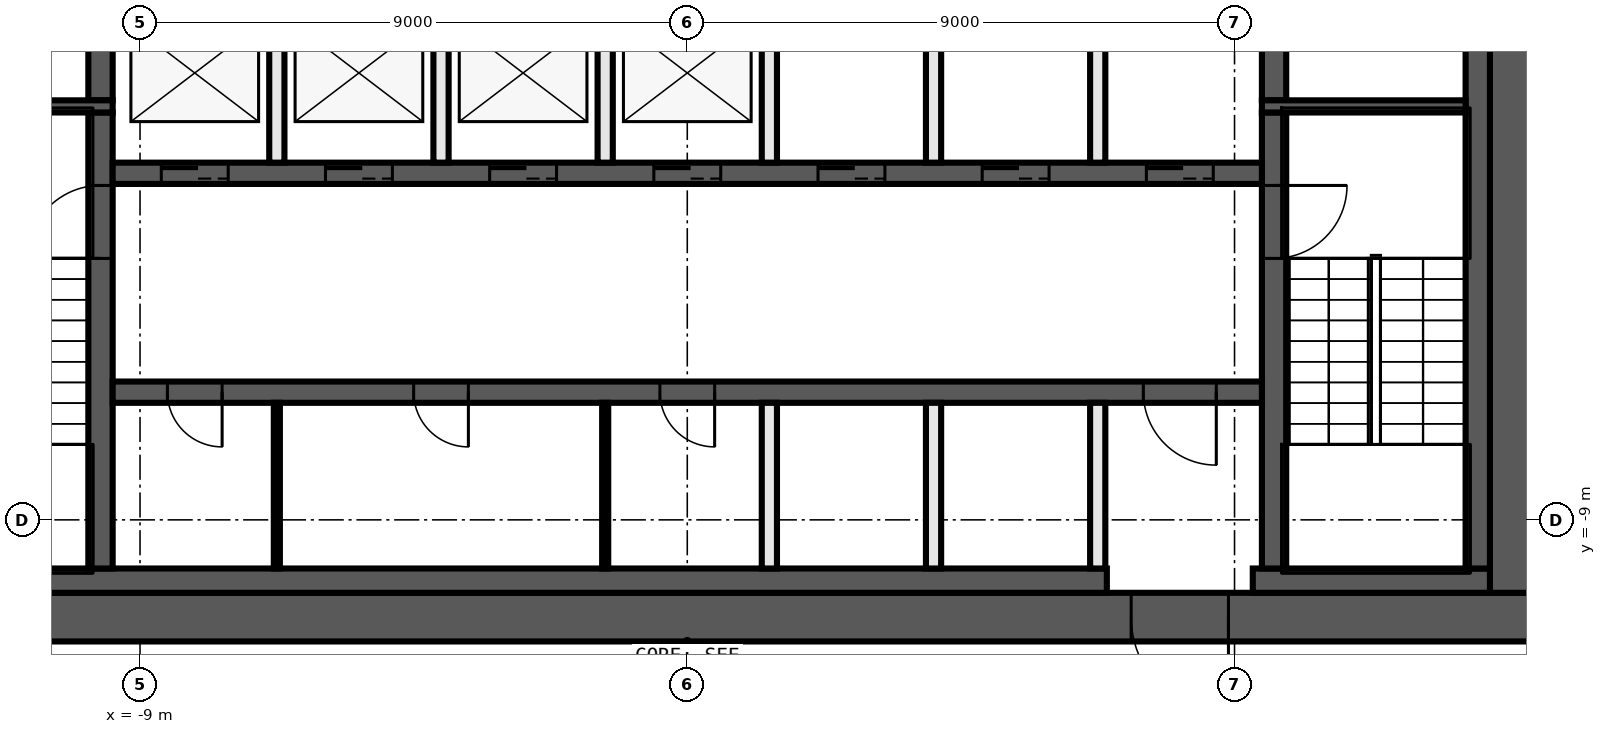
"""IFC4 building model, lengths in metres.
Left out: names, types, materials, properties, quantities, classifications, styles, units other than length and angle.
Written with IfcOpenShell. Run it as: python <this file> out.ifc"""

import sys

from ifc_helpers import new_model, si_unit, direction, frame, frame_2d, origin, place, context, subcontext, project, spatial, rectangle, extrude, element, fill, save


model = new_model("IFC4")
c1 = context("Model", 3, precision=1e-05, world=origin(), true_north=direction((0.0, 1.0)))
c2 = subcontext(c1, "Body", "Model", "MODEL_VIEW")
j1 = project(units=[si_unit("LENGTHUNIT", "METRE"), si_unit("PLANEANGLEUNIT", "RADIAN")], contexts=[c1])
p1 = place(None, origin())
s1 = spatial("IfcSite", under=j1, at=p1, CompositionType="ELEMENT")
p2 = place(p1, origin())
s2 = spatial("IfcBuilding", under=s1, at=p2, CompositionType="ELEMENT")
p3 = place(p2, frame((0.0, 0.0, 151.6)))
s3 = spatial("IfcBuildingStorey", under=s2, at=p3, CompositionType="ELEMENT", Elevation=151.6)
p4 = place(p3, frame((14.0, -10.6, 0.0), z_axis=(0.0, 0.0, 1.0), x_axis=(-1.0, 0.0, 0.0)))
e1 = element("IfcWall", 1, at=p4, inside=s3, PredefinedType="SHEAR", context=c2, shape_type="SweptSolid", body=[
    extrude(rectangle(XDim=28.0, YDim=0.8, at=frame_2d((14.0, 0.0))), origin(), (0.0, 0.0, 1.0), 6.62),
])
p5 = place(p4, frame((5.1, 0.0, 0.0)))
e2 = element("IfcOpeningElement", 2, at=p5, cuts=e1, PredefinedType="OPENING", context=c2, shape_type="SweptSolid", body=[
    extrude(rectangle(XDim=1.6, YDim=2.1, at=frame_2d((0.8, 1.05))), frame((0.0, 0.41, 0.0), z_axis=(0.0, -1.0, 0.0), x_axis=(1.0, 0.0, 0.0)), (0.0, 0.0, 1.0), 0.82),
])
p6 = place(p3, frame((13.6, 10.2, 0.0), z_axis=(0.0, 0.0, 1.0), x_axis=(0.0, -1.0, 0.0)))
e3 = element("IfcWall", 3, at=p6, inside=s3, PredefinedType="SHEAR", context=c2, shape_type="SweptSolid", body=[
    extrude(rectangle(XDim=20.4, YDim=0.8, at=frame_2d((10.2, 0.0))), origin(), (0.0, 0.0, 1.0), 6.62),
])
p7 = place(p3, frame((13.2, -10.0, 0.0), z_axis=(0.0, 0.0, 1.0), x_axis=(-1.0, 0.0, 0.0)))
e4 = element("IfcWall", 4, at=p7, inside=s3, PredefinedType="SHEAR", context=c2, shape_type="SweptSolid", body=[
    extrude(rectangle(XDim=3.9, YDim=0.4, at=frame_2d((1.95, 0.0))), origin(), (0.0, 0.0, 1.0), 6.62),
])
p8 = place(p3, frame((6.9, -10.0, 0.0), z_axis=(0.0, 0.0, 1.0), x_axis=(-1.0, 0.0, 0.0)))
e5 = element("IfcWall", 5, at=p8, inside=s3, PredefinedType="SHEAR", context=c2, shape_type="SweptSolid", body=[
    extrude(rectangle(XDim=20.1, YDim=0.4, at=frame_2d((10.05, 0.0))), origin(), (0.0, 0.0, 1.0), 6.62),
])
p9 = place(p3, frame((13.0, 9.8, 0.0), z_axis=(0.0, 0.0, 1.0), x_axis=(0.0, -1.0, 0.0)))
e6 = element("IfcWall", 6, at=p9, inside=s3, PredefinedType="SHEAR", context=c2, shape_type="SweptSolid", body=[
    extrude(rectangle(XDim=19.6, YDim=0.4, at=frame_2d((9.8, 0.0))), origin(), (0.0, 0.0, 1.0), 6.62),
])
p10 = place(p3, frame((9.65, -2.3, 0.0), z_axis=(0.0, 0.0, 1.0), x_axis=(0.0, -1.0, 0.0)))
e7 = element("IfcWall", 7, at=p10, inside=s3, PredefinedType="SHEAR", context=c2, shape_type="SweptSolid", body=[
    extrude(rectangle(XDim=7.5, YDim=0.4, at=frame_2d((3.75, 0.0))), origin(), (0.0, 0.0, 1.0), 6.62),
])
p11 = place(p10, frame((1.2, 0.0, 0.0)))
e8 = element("IfcOpeningElement", 8, at=p11, cuts=e7, PredefinedType="OPENING", context=c2, shape_type="SweptSolid", body=[
    extrude(rectangle(XDim=1.2, YDim=2.1, at=frame_2d((0.6, 1.05))), frame((0.0, 0.21, 0.0), z_axis=(0.0, -1.0, 0.0), x_axis=(1.0, 0.0, 0.0)), (0.0, 0.0, 1.0), 0.42),
])
p12 = place(p3, frame((9.65, 2.1, 0.0), z_axis=(0.0, 0.0, 1.0), x_axis=(0.0, -1.0, 0.0)))
e9 = element("IfcWall", 9, at=p12, inside=s3, PredefinedType="SHEAR", context=c2, shape_type="SweptSolid", body=[
    extrude(rectangle(XDim=4.2, YDim=0.4, at=frame_2d((2.1, 0.0))), origin(), (0.0, 0.0, 1.0), 6.62),
])
p13 = place(p12, frame((0.15, 0.0, 0.0)))
e10 = element("IfcOpeningElement", 10, at=p13, cuts=e9, PredefinedType="OPENING", context=c2, shape_type="SweptSolid", body=[
    extrude(rectangle(XDim=0.9, YDim=2.1, at=frame_2d((0.45, 1.05))), frame((0.0, 0.21, 0.0), z_axis=(0.0, -1.0, 0.0), x_axis=(1.0, 0.0, 0.0)), (0.0, 0.0, 1.0), 0.42),
])
p14 = place(p3, frame((-9.65, -9.8, 0.0), z_axis=(0.0, 0.0, 1.0), x_axis=(0.0, 1.0, 0.0)))
e11 = element("IfcWall", 11, at=p14, inside=s3, PredefinedType="SHEAR", context=c2, shape_type="SweptSolid", body=[
    extrude(rectangle(XDim=7.5, YDim=0.4, at=frame_2d((3.75, 0.0))), origin(), (0.0, 0.0, 1.0), 6.62),
])
p15 = place(p14, frame((5.1, 0.0, 0.0)))
e12 = element("IfcOpeningElement", 12, at=p15, cuts=e11, PredefinedType="OPENING", context=c2, shape_type="SweptSolid", body=[
    extrude(rectangle(XDim=1.2, YDim=2.1, at=frame_2d((0.6, 1.05))), frame((0.0, 0.21, 0.0), z_axis=(0.0, -1.0, 0.0), x_axis=(1.0, 0.0, 0.0)), (0.0, 0.0, 1.0), 0.42),
])
p16 = place(p3, frame((-9.65, -2.1, 0.0), z_axis=(0.0, 0.0, 1.0), x_axis=(0.0, 1.0, 0.0)))
e13 = element("IfcWall", 13, at=p16, inside=s3, PredefinedType="SHEAR", context=c2, shape_type="SweptSolid", body=[
    extrude(rectangle(XDim=4.2, YDim=0.4, at=frame_2d((2.1, 0.0))), origin(), (0.0, 0.0, 1.0), 6.62),
])
for number, where, z_axis, x_axis in (
    (14, (9.45, -2.2, 0.0), (0.0, 0.0, 1.0), (1.0, 0.0, 0.0)),
    (15, (-9.45, -2.2, 0.0), (0.0, 0.0, 1.0), (-1.0, 0.0, 0.0)),
):
    element("IfcWall", number, at=place(p3, frame(where, z_axis=z_axis, x_axis=x_axis)), inside=s3, PredefinedType="SHEAR", context=c2, shape_type="SweptSolid", body=[
        extrude(rectangle(XDim=3.35, YDim=0.2, at=frame_2d((1.675, 0.0))), origin(), (0.0, 0.0, 1.0), 6.62),
    ])
p17 = place(p3, frame((-9.45, -3.3, 0.0), z_axis=(0.0, 0.0, 1.0), x_axis=(1.0, 0.0, 0.0)))
e16 = element("IfcWall", 16, at=p17, inside=s3, PredefinedType="SHEAR", context=c2, shape_type="SweptSolid", body=[
    extrude(rectangle(XDim=18.9, YDim=0.35, at=frame_2d((9.45, 0.0))), origin(), (0.0, 0.0, 1.0), 6.62),
])
p18 = place(p17, frame((0.8, 0.0, 0.0)))
e17 = element("IfcOpeningElement", 17, at=p18, cuts=e16, PredefinedType="OPENING", context=c2, shape_type="SweptSolid", body=[
    extrude(rectangle(XDim=1.1, YDim=2.1, at=frame_2d((0.55, 1.05))), frame((0.0, 0.185, 0.0), z_axis=(0.0, -1.0, 0.0), x_axis=(1.0, 0.0, 0.0)), (0.0, 0.0, 1.0), 0.37),
])
p19 = place(p17, frame((3.5, 0.0, 0.0)))
e18 = element("IfcOpeningElement", 18, at=p19, cuts=e16, PredefinedType="OPENING", context=c2, shape_type="SweptSolid", body=[
    extrude(rectangle(XDim=1.1, YDim=2.1, at=frame_2d((0.55, 1.05))), frame((0.0, 0.185, 0.0), z_axis=(0.0, -1.0, 0.0), x_axis=(1.0, 0.0, 0.0)), (0.0, 0.0, 1.0), 0.37),
])
p20 = place(p17, frame((6.2, 0.0, 0.0)))
e19 = element("IfcOpeningElement", 19, at=p20, cuts=e16, PredefinedType="OPENING", context=c2, shape_type="SweptSolid", body=[
    extrude(rectangle(XDim=1.1, YDim=2.1, at=frame_2d((0.55, 1.05))), frame((0.0, 0.185, 0.0), z_axis=(0.0, -1.0, 0.0), x_axis=(1.0, 0.0, 0.0)), (0.0, 0.0, 1.0), 0.37),
])
p21 = place(p17, frame((8.9, 0.0, 0.0)))
e20 = element("IfcOpeningElement", 20, at=p21, cuts=e16, PredefinedType="OPENING", context=c2, shape_type="SweptSolid", body=[
    extrude(rectangle(XDim=1.1, YDim=2.1, at=frame_2d((0.55, 1.05))), frame((0.0, 0.185, 0.0), z_axis=(0.0, -1.0, 0.0), x_axis=(1.0, 0.0, 0.0)), (0.0, 0.0, 1.0), 0.37),
])
p22 = place(p17, frame((11.6, 0.0, 0.0)))
e21 = element("IfcOpeningElement", 21, at=p22, cuts=e16, PredefinedType="OPENING", context=c2, shape_type="SweptSolid", body=[
    extrude(rectangle(XDim=1.1, YDim=2.1, at=frame_2d((0.55, 1.05))), frame((0.0, 0.185, 0.0), z_axis=(0.0, -1.0, 0.0), x_axis=(1.0, 0.0, 0.0)), (0.0, 0.0, 1.0), 0.37),
])
p23 = place(p17, frame((14.3, 0.0, 0.0)))
e22 = element("IfcOpeningElement", 22, at=p23, cuts=e16, PredefinedType="OPENING", context=c2, shape_type="SweptSolid", body=[
    extrude(rectangle(XDim=1.1, YDim=2.1, at=frame_2d((0.55, 1.05))), frame((0.0, 0.185, 0.0), z_axis=(0.0, -1.0, 0.0), x_axis=(1.0, 0.0, 0.0)), (0.0, 0.0, 1.0), 0.37),
])
p24 = place(p17, frame((17.0, 0.0, 0.0)))
e23 = element("IfcOpeningElement", 23, at=p24, cuts=e16, PredefinedType="OPENING", context=c2, shape_type="SweptSolid", body=[
    extrude(rectangle(XDim=1.1, YDim=2.1, at=frame_2d((0.55, 1.05))), frame((0.0, 0.185, 0.0), z_axis=(0.0, -1.0, 0.0), x_axis=(1.0, 0.0, 0.0)), (0.0, 0.0, 1.0), 0.37),
])
p25 = place(p3, frame((9.45, -6.9, 0.0), z_axis=(0.0, 0.0, 1.0), x_axis=(-1.0, 0.0, 0.0)))
e24 = element("IfcWall", 24, at=p25, inside=s3, PredefinedType="SHEAR", context=c2, shape_type="SweptSolid", body=[
    extrude(rectangle(XDim=18.9, YDim=0.35, at=frame_2d((9.45, 0.0))), origin(), (0.0, 0.0, 1.0), 6.62),
])
p26 = place(p25, frame((0.75, 0.0, 0.0)))
e25 = element("IfcOpeningElement", 25, at=p26, cuts=e24, PredefinedType="OPENING", context=c2, shape_type="SweptSolid", body=[
    extrude(rectangle(XDim=1.2, YDim=2.1, at=frame_2d((0.6, 1.05))), frame((0.0, 0.185, 0.0), z_axis=(0.0, -1.0, 0.0), x_axis=(1.0, 0.0, 0.0)), (0.0, 0.0, 1.0), 0.37),
])
p27 = place(p25, frame((17.1, 0.0, 0.0)))
e26 = element("IfcOpeningElement", 26, at=p27, cuts=e24, PredefinedType="OPENING", context=c2, shape_type="SweptSolid", body=[
    extrude(rectangle(XDim=0.9, YDim=2.1, at=frame_2d((0.45, 1.05))), frame((0.0, 0.185, 0.0), z_axis=(0.0, -1.0, 0.0), x_axis=(1.0, 0.0, 0.0)), (0.0, 0.0, 1.0), 0.37),
])
p28 = place(p25, frame((13.05, 0.0, 0.0)))
e27 = element("IfcOpeningElement", 27, at=p28, cuts=e24, PredefinedType="OPENING", context=c2, shape_type="SweptSolid", body=[
    extrude(rectangle(XDim=0.9, YDim=2.1, at=frame_2d((0.45, 1.05))), frame((0.0, 0.185, 0.0), z_axis=(0.0, -1.0, 0.0), x_axis=(1.0, 0.0, 0.0)), (0.0, 0.0, 1.0), 0.37),
])
p29 = place(p25, frame((9.0, 0.0, 0.0)))
e28 = element("IfcOpeningElement", 28, at=p29, cuts=e24, PredefinedType="OPENING", context=c2, shape_type="SweptSolid", body=[
    extrude(rectangle(XDim=0.9, YDim=2.1, at=frame_2d((0.45, 1.05))), frame((0.0, 0.185, 0.0), z_axis=(0.0, -1.0, 0.0), x_axis=(1.0, 0.0, 0.0)), (0.0, 0.0, 1.0), 0.37),
])
for number, where, z_axis, x_axis in (
    (29, (6.75, -9.8, 0.0), (0.0, 0.0, 1.0), (0.0, 1.0, 0.0)),
    (30, (6.75, -3.125, 0.0), (0.0, 0.0, 1.0), (0.0, 1.0, 0.0)),
    (31, (4.05, -9.8, 0.0), (0.0, 0.0, 1.0), (0.0, 1.0, 0.0)),
    (32, (4.05, -3.125, 0.0), (0.0, 0.0, 1.0), (0.0, 1.0, 0.0)),
    (33, (1.35, -9.8, 0.0), (0.0, 0.0, 1.0), (0.0, 1.0, 0.0)),
    (34, (1.35, -3.125, 0.0), (0.0, 0.0, 1.0), (0.0, 1.0, 0.0)),
):
    element("IfcWall", number, at=place(p3, frame(where, z_axis=z_axis, x_axis=x_axis)), inside=s3, PredefinedType="SOLIDWALL", context=c2, shape_type="SweptSolid", body=[
        extrude(rectangle(XDim=2.725, YDim=0.25, at=frame_2d((1.363, 0.0))), origin(), (0.0, 0.0, 1.0), 6.62),
    ])
p30 = place(p3, frame((-1.35, -9.8, 0.0), z_axis=(0.0, 0.0, 1.0), x_axis=(0.0, 1.0, 0.0)))
e35 = element("IfcWall", 35, at=p30, inside=s3, PredefinedType="PARTITIONING", context=c2, shape_type="SweptSolid", body=[
    extrude(rectangle(XDim=2.725, YDim=0.1, at=frame_2d((1.363, 0.0))), origin(), (0.0, 0.0, 1.0), 6.62),
])
for number, where, z_axis, x_axis in (
    (36, (-1.35, -3.125, 0.0), (0.0, 0.0, 1.0), (0.0, 1.0, 0.0)),
    (37, (-4.05, -3.125, 0.0), (0.0, 0.0, 1.0), (0.0, 1.0, 0.0)),
):
    element("IfcWall", number, at=place(p3, frame(where, z_axis=z_axis, x_axis=x_axis)), inside=s3, PredefinedType="SOLIDWALL", context=c2, shape_type="SweptSolid", body=[
        extrude(rectangle(XDim=2.725, YDim=0.25, at=frame_2d((1.363, 0.0))), origin(), (0.0, 0.0, 1.0), 6.62),
    ])
p31 = place(p3, frame((-6.75, -9.8, 0.0), z_axis=(0.0, 0.0, 1.0), x_axis=(0.0, 1.0, 0.0)))
e38 = element("IfcWall", 38, at=p31, inside=s3, PredefinedType="PARTITIONING", context=c2, shape_type="SweptSolid", body=[
    extrude(rectangle(XDim=2.725, YDim=0.1, at=frame_2d((1.363, 0.0))), origin(), (0.0, 0.0, 1.0), 6.62),
])
p32 = place(p3, frame((-6.75, -3.125, 0.0), z_axis=(0.0, 0.0, 1.0), x_axis=(0.0, 1.0, 0.0)))
e39 = element("IfcWall", 39, at=p32, inside=s3, PredefinedType="SOLIDWALL", context=c2, shape_type="SweptSolid", body=[
    extrude(rectangle(XDim=2.725, YDim=0.25, at=frame_2d((1.363, 0.0))), origin(), (0.0, 0.0, 1.0), 6.62),
])
p33 = place(p18, origin())
e40 = element("IfcDoor", 40, at=p33, inside=s3, OperationType="DOUBLE_DOOR_SLIDING", PredefinedType="DOOR", context=c2, shape_type="SweptSolid", body=[
    extrude(rectangle(XDim=1.1, YDim=2.1, at=frame_2d((0.55, 1.05))), frame((0.0, 0.025, 0.0), z_axis=(0.0, -1.0, 0.0), x_axis=(1.0, 0.0, 0.0)), (0.0, 0.0, 1.0), 0.05),
])
fill(e17, e40)
p34 = place(p19, origin())
e41 = element("IfcDoor", 41, at=p34, inside=s3, OperationType="DOUBLE_DOOR_SLIDING", PredefinedType="DOOR", context=c2, shape_type="SweptSolid", body=[
    extrude(rectangle(XDim=1.1, YDim=2.1, at=frame_2d((0.55, 1.05))), frame((0.0, 0.025, 0.0), z_axis=(0.0, -1.0, 0.0), x_axis=(1.0, 0.0, 0.0)), (0.0, 0.0, 1.0), 0.05),
])
fill(e18, e41)
p35 = place(p20, origin())
e42 = element("IfcDoor", 42, at=p35, inside=s3, OperationType="DOUBLE_DOOR_SLIDING", PredefinedType="DOOR", context=c2, shape_type="SweptSolid", body=[
    extrude(rectangle(XDim=1.1, YDim=2.1, at=frame_2d((0.55, 1.05))), frame((0.0, 0.025, 0.0), z_axis=(0.0, -1.0, 0.0), x_axis=(1.0, 0.0, 0.0)), (0.0, 0.0, 1.0), 0.05),
])
fill(e19, e42)
p36 = place(p21, origin())
e43 = element("IfcDoor", 43, at=p36, inside=s3, OperationType="DOUBLE_DOOR_SLIDING", PredefinedType="DOOR", context=c2, shape_type="SweptSolid", body=[
    extrude(rectangle(XDim=1.1, YDim=2.1, at=frame_2d((0.55, 1.05))), frame((0.0, 0.025, 0.0), z_axis=(0.0, -1.0, 0.0), x_axis=(1.0, 0.0, 0.0)), (0.0, 0.0, 1.0), 0.05),
])
fill(e20, e43)
p37 = place(p22, origin())
e44 = element("IfcDoor", 44, at=p37, inside=s3, OperationType="DOUBLE_DOOR_SLIDING", PredefinedType="DOOR", context=c2, shape_type="SweptSolid", body=[
    extrude(rectangle(XDim=1.1, YDim=2.1, at=frame_2d((0.55, 1.05))), frame((0.0, 0.025, 0.0), z_axis=(0.0, -1.0, 0.0), x_axis=(1.0, 0.0, 0.0)), (0.0, 0.0, 1.0), 0.05),
])
fill(e21, e44)
p38 = place(p23, origin())
e45 = element("IfcDoor", 45, at=p38, inside=s3, OperationType="DOUBLE_DOOR_SLIDING", PredefinedType="DOOR", context=c2, shape_type="SweptSolid", body=[
    extrude(rectangle(XDim=1.1, YDim=2.1, at=frame_2d((0.55, 1.05))), frame((0.0, 0.025, 0.0), z_axis=(0.0, -1.0, 0.0), x_axis=(1.0, 0.0, 0.0)), (0.0, 0.0, 1.0), 0.05),
])
fill(e22, e45)
p39 = place(p24, origin())
e46 = element("IfcDoor", 46, at=p39, inside=s3, OperationType="DOUBLE_DOOR_SLIDING", PredefinedType="DOOR", context=c2, shape_type="SweptSolid", body=[
    extrude(rectangle(XDim=1.1, YDim=2.1, at=frame_2d((0.55, 1.05))), frame((0.0, 0.025, 0.0), z_axis=(0.0, -1.0, 0.0), x_axis=(1.0, 0.0, 0.0)), (0.0, 0.0, 1.0), 0.05),
])
fill(e23, e46)
p40 = place(p5, origin())
e47 = element("IfcDoor", 47, at=p40, inside=s3, OperationType="DOUBLE_DOOR_SINGLE_SWING", PredefinedType="DOOR", context=c2, shape_type="SweptSolid", body=[
    extrude(rectangle(XDim=1.6, YDim=2.1, at=frame_2d((0.8, 1.05))), frame((0.0, 0.025, 0.0), z_axis=(0.0, -1.0, 0.0), x_axis=(1.0, 0.0, 0.0)), (0.0, 0.0, 1.0), 0.05),
])
fill(e2, e47)
p41 = place(p26, origin())
e48 = element("IfcDoor", 48, at=p41, inside=s3, OperationType="SINGLE_SWING_LEFT", PredefinedType="DOOR", context=c2, shape_type="SweptSolid", body=[
    extrude(rectangle(XDim=1.2, YDim=2.1, at=frame_2d((0.6, 1.05))), frame((0.0, 0.025, 0.0), z_axis=(0.0, -1.0, 0.0), x_axis=(1.0, 0.0, 0.0)), (0.0, 0.0, 1.0), 0.05),
])
fill(e25, e48)
p42 = place(p27, origin())
e49 = element("IfcDoor", 49, at=p42, inside=s3, OperationType="SINGLE_SWING_RIGHT", PredefinedType="DOOR", context=c2, shape_type="SweptSolid", body=[
    extrude(rectangle(XDim=0.9, YDim=2.1, at=frame_2d((0.45, 1.05))), frame((0.0, 0.025, 0.0), z_axis=(0.0, -1.0, 0.0), x_axis=(1.0, 0.0, 0.0)), (0.0, 0.0, 1.0), 0.05),
])
fill(e26, e49)
p43 = place(p28, origin())
e50 = element("IfcDoor", 50, at=p43, inside=s3, OperationType="SINGLE_SWING_LEFT", PredefinedType="DOOR", context=c2, shape_type="SweptSolid", body=[
    extrude(rectangle(XDim=0.9, YDim=2.1, at=frame_2d((0.45, 1.05))), frame((0.0, 0.025, 0.0), z_axis=(0.0, -1.0, 0.0), x_axis=(1.0, 0.0, 0.0)), (0.0, 0.0, 1.0), 0.05),
])
fill(e27, e50)
p44 = place(p29, origin())
e51 = element("IfcDoor", 51, at=p44, inside=s3, OperationType="SINGLE_SWING_RIGHT", PredefinedType="DOOR", context=c2, shape_type="SweptSolid", body=[
    extrude(rectangle(XDim=0.9, YDim=2.1, at=frame_2d((0.45, 1.05))), frame((0.0, 0.025, 0.0), z_axis=(0.0, -1.0, 0.0), x_axis=(1.0, 0.0, 0.0)), (0.0, 0.0, 1.0), 0.05),
])
fill(e28, e51)
p45 = place(p11, origin())
e52 = element("IfcDoor", 52, at=p45, inside=s3, OperationType="SINGLE_SWING_RIGHT", PredefinedType="DOOR", context=c2, shape_type="SweptSolid", body=[
    extrude(rectangle(XDim=1.2, YDim=2.1, at=frame_2d((0.6, 1.05))), frame((0.0, 0.025, 0.0), z_axis=(0.0, -1.0, 0.0), x_axis=(1.0, 0.0, 0.0)), (0.0, 0.0, 1.0), 0.05),
])
fill(e8, e52)
p46 = place(p15, origin())
e53 = element("IfcDoor", 53, at=p46, inside=s3, OperationType="SINGLE_SWING_LEFT", PredefinedType="DOOR", context=c2, shape_type="SweptSolid", body=[
    extrude(rectangle(XDim=1.2, YDim=2.1, at=frame_2d((0.6, 1.05))), frame((0.0, 0.025, 0.0), z_axis=(0.0, -1.0, 0.0), x_axis=(1.0, 0.0, 0.0)), (0.0, 0.0, 1.0), 0.05),
])
fill(e12, e53)
save(model, sys.argv[1])
